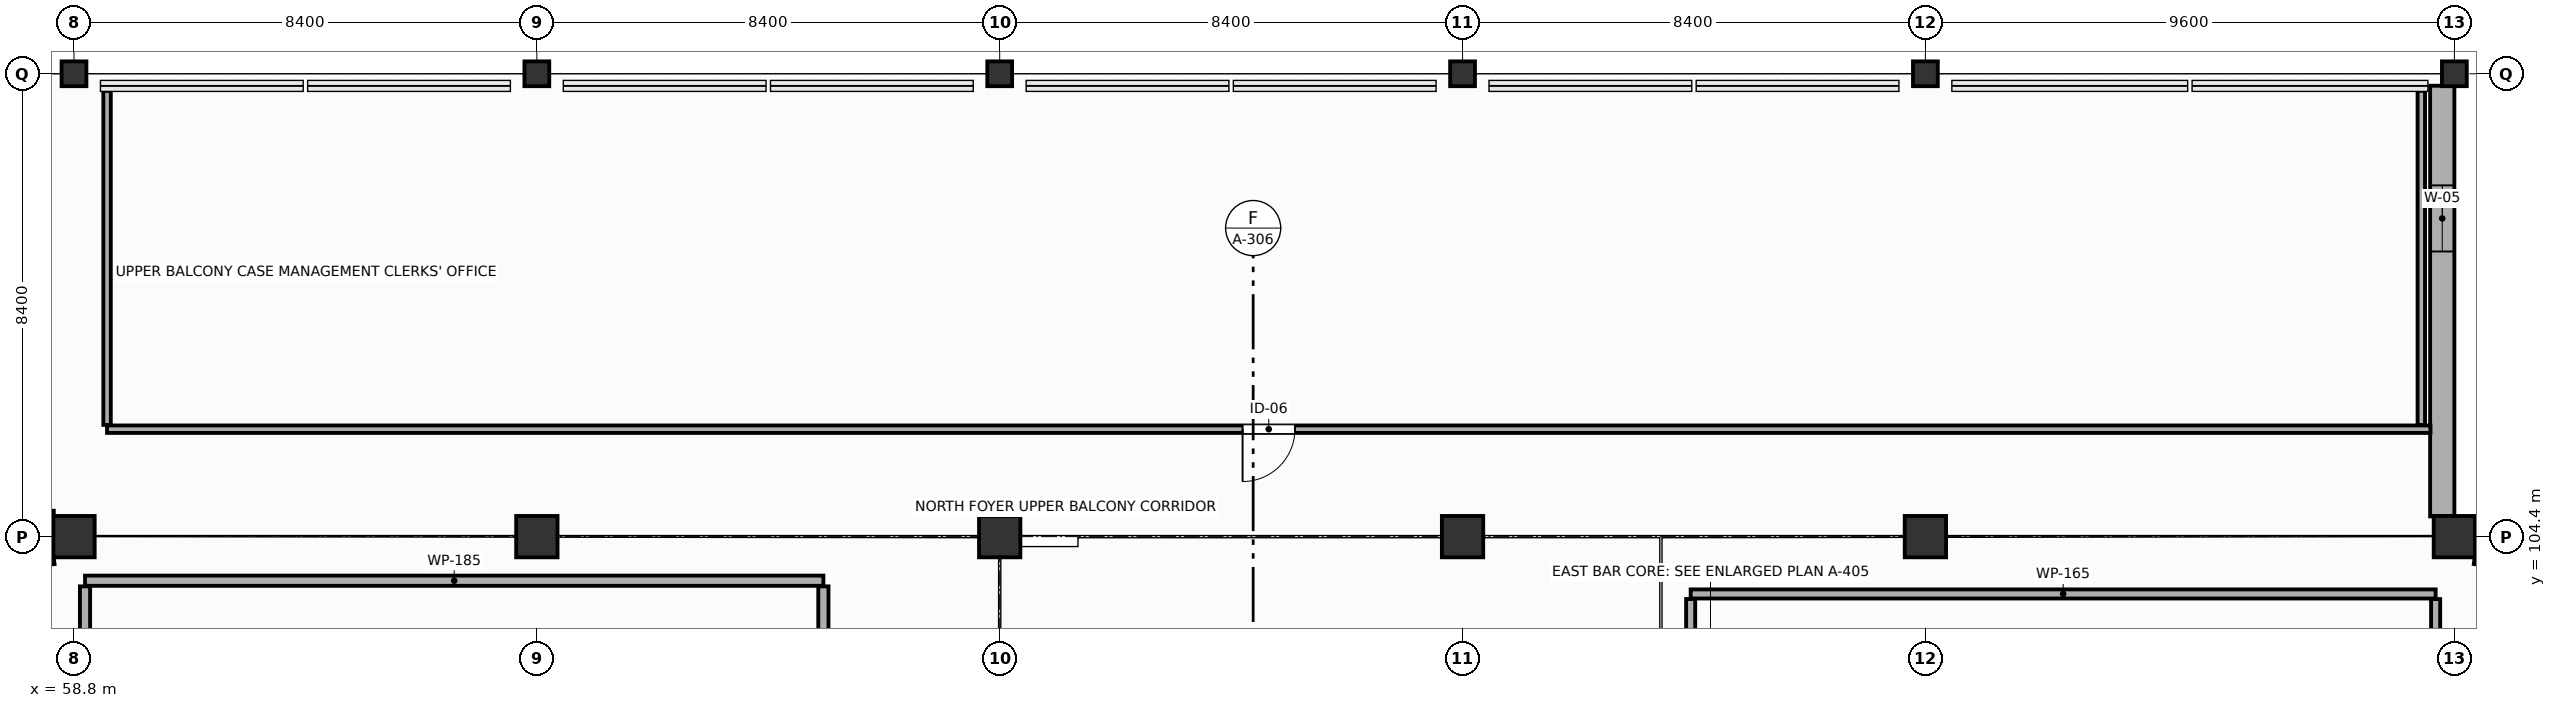
"""IFC4 building model, lengths in metres.
Left out: names, types, materials, properties, quantities, classifications, styles, units other than length and angle.
Written with IfcOpenShell. Run it as: python <this file> out.ifc"""

import sys

from ifc_helpers import new_model, si_unit, direction, frame, frame_2d, origin, origin_2d, place, context, subcontext, project, spatial, rectangle, extrude, element, fill, save


model = new_model("IFC4")
c1 = context("Model", 3, precision=1e-05, world=origin(), true_north=direction((0.0, 1.0)))
c2 = subcontext(c1, "Body", "Model", "MODEL_VIEW")
j1 = project(units=[si_unit("LENGTHUNIT", "METRE"), si_unit("PLANEANGLEUNIT", "RADIAN")], contexts=[c1])
p1 = place(None, origin())
s1 = spatial("IfcSite", under=j1, at=p1, CompositionType="ELEMENT")
p2 = place(p1, origin())
s2 = spatial("IfcBuilding", under=s1, at=p2, CompositionType="ELEMENT")
p3 = place(p2, frame((0.0, 0.0, 9.9)))
s3 = spatial("IfcBuildingStorey", under=s2, at=p3, CompositionType="ELEMENT", Elevation=9.9)
p4 = place(p3, frame((58.8, 104.4, 0.0), z_axis=(0.0, 0.0, 1.0), x_axis=(1.0, 0.0, 0.0)))
e1 = element("IfcColumn", 1, at=p4, inside=s3, PredefinedType="COLUMN", context=c2, shape_type="SweptSolid", body=[
    extrude(rectangle(XDim=0.75, YDim=0.75, at=origin_2d()), origin(), (0.0, 0.0, 1.0), 4.5),
])
p5 = place(p3, frame((58.8, 112.8, 0.0), z_axis=(0.0, 0.0, 1.0), x_axis=(1.0, 0.0, 0.0)))
e2 = element("IfcColumn", 2, at=p5, inside=s3, PredefinedType="COLUMN", context=c2, shape_type="SweptSolid", body=[
    extrude(rectangle(XDim=0.45, YDim=0.45, at=origin_2d()), origin(), (0.0, 0.0, 1.0), 4.5),
])
p6 = place(p3, frame((67.2, 104.4, 0.0), z_axis=(0.0, 0.0, 1.0), x_axis=(1.0, 0.0, 0.0)))
e3 = element("IfcColumn", 3, at=p6, inside=s3, PredefinedType="COLUMN", context=c2, shape_type="SweptSolid", body=[
    extrude(rectangle(XDim=0.75, YDim=0.75, at=origin_2d()), origin(), (0.0, 0.0, 1.0), 4.5),
])
p7 = place(p3, frame((67.2, 112.8, 0.0), z_axis=(0.0, 0.0, 1.0), x_axis=(1.0, 0.0, 0.0)))
e4 = element("IfcColumn", 4, at=p7, inside=s3, PredefinedType="COLUMN", context=c2, shape_type="SweptSolid", body=[
    extrude(rectangle(XDim=0.45, YDim=0.45, at=origin_2d()), origin(), (0.0, 0.0, 1.0), 4.5),
])
p8 = place(p3, frame((75.6, 104.4, 0.0), z_axis=(0.0, 0.0, 1.0), x_axis=(1.0, 0.0, 0.0)))
e5 = element("IfcColumn", 5, at=p8, inside=s3, PredefinedType="COLUMN", context=c2, shape_type="SweptSolid", body=[
    extrude(rectangle(XDim=0.75, YDim=0.75, at=origin_2d()), origin(), (0.0, 0.0, 1.0), 4.5),
])
p9 = place(p3, frame((75.6, 112.8, 0.0), z_axis=(0.0, 0.0, 1.0), x_axis=(1.0, 0.0, 0.0)))
e6 = element("IfcColumn", 6, at=p9, inside=s3, PredefinedType="COLUMN", context=c2, shape_type="SweptSolid", body=[
    extrude(rectangle(XDim=0.45, YDim=0.45, at=origin_2d()), origin(), (0.0, 0.0, 1.0), 4.5),
])
p10 = place(p3, frame((84.0, 104.4, 0.0), z_axis=(0.0, 0.0, 1.0), x_axis=(1.0, 0.0, 0.0)))
e7 = element("IfcColumn", 7, at=p10, inside=s3, PredefinedType="COLUMN", context=c2, shape_type="SweptSolid", body=[
    extrude(rectangle(XDim=0.75, YDim=0.75, at=origin_2d()), origin(), (0.0, 0.0, 1.0), 4.5),
])
p11 = place(p3, frame((84.0, 112.8, 0.0), z_axis=(0.0, 0.0, 1.0), x_axis=(1.0, 0.0, 0.0)))
e8 = element("IfcColumn", 8, at=p11, inside=s3, PredefinedType="COLUMN", context=c2, shape_type="SweptSolid", body=[
    extrude(rectangle(XDim=0.45, YDim=0.45, at=origin_2d()), origin(), (0.0, 0.0, 1.0), 4.5),
])
p12 = place(p3, frame((92.4, 104.4, 0.0), z_axis=(0.0, 0.0, 1.0), x_axis=(1.0, 0.0, 0.0)))
e9 = element("IfcColumn", 9, at=p12, inside=s3, PredefinedType="COLUMN", context=c2, shape_type="SweptSolid", body=[
    extrude(rectangle(XDim=0.75, YDim=0.75, at=origin_2d()), origin(), (0.0, 0.0, 1.0), 4.5),
])
p13 = place(p3, frame((92.4, 112.8, 0.0), z_axis=(0.0, 0.0, 1.0), x_axis=(1.0, 0.0, 0.0)))
e10 = element("IfcColumn", 10, at=p13, inside=s3, PredefinedType="COLUMN", context=c2, shape_type="SweptSolid", body=[
    extrude(rectangle(XDim=0.45, YDim=0.45, at=origin_2d()), origin(), (0.0, 0.0, 1.0), 4.5),
])
p14 = place(p3, frame((102.0, 104.4, 0.0), z_axis=(0.0, 0.0, 1.0), x_axis=(1.0, 0.0, 0.0)))
e11 = element("IfcColumn", 11, at=p14, inside=s3, PredefinedType="COLUMN", context=c2, shape_type="SweptSolid", body=[
    extrude(rectangle(XDim=0.75, YDim=0.75, at=origin_2d()), origin(), (0.0, 0.0, 1.0), 4.5),
])
p15 = place(p3, frame((102.0, 112.8, 0.0), z_axis=(0.0, 0.0, 1.0), x_axis=(1.0, 0.0, 0.0)))
e12 = element("IfcColumn", 12, at=p15, inside=s3, PredefinedType="COLUMN", context=c2, shape_type="SweptSolid", body=[
    extrude(rectangle(XDim=0.45, YDim=0.45, at=origin_2d()), origin(), (0.0, 0.0, 1.0), 4.5),
])
p16 = place(p3, frame((58.433, 104.65, 0.0), z_axis=(0.0, 0.0, 1.0), x_axis=(-1.0, 0.0, 0.0)))
e13 = element("IfcWall", 13, at=p16, inside=s3, PredefinedType="STANDARD", context=c2, shape_type="SweptSolid", body=[
    extrude(rectangle(XDim=11.733, YDim=0.44, at=frame_2d((5.867, 0.0))), origin(), (0.0, 0.0, 1.0), 3.33),
])
p17 = place(p16, frame((2.708, 0.0, 0.9)))
e14 = element("IfcOpeningElement", 14, at=p17, cuts=e13, PredefinedType="OPENING", context=c2, shape_type="SweptSolid", body=[
    extrude(rectangle(XDim=1.2, YDim=1.85, at=frame_2d((0.6, 0.925))), frame((0.0, 0.23, 0.0), z_axis=(0.0, -1.0, 0.0), x_axis=(1.0, 0.0, 0.0)), (0.0, 0.0, 1.0), 0.46),
])
p18 = place(p16, frame((7.958, 0.0, 0.9)))
e15 = element("IfcOpeningElement", 15, at=p18, cuts=e13, PredefinedType="OPENING", context=c2, shape_type="SweptSolid", body=[
    extrude(rectangle(XDim=1.2, YDim=1.85, at=frame_2d((0.6, 0.925))), frame((0.0, 0.23, 0.0), z_axis=(0.0, -1.0, 0.0), x_axis=(1.0, 0.0, 0.0)), (0.0, 0.0, 1.0), 0.46),
])
p19 = place(p3, frame((101.78, 112.583, 0.0), z_axis=(0.0, 0.0, 1.0), x_axis=(0.0, -1.0, 0.0)))
e16 = element("IfcWall", 16, at=p19, inside=s3, PredefinedType="STANDARD", context=c2, shape_type="SweptSolid", body=[
    extrude(rectangle(XDim=7.816, YDim=0.44, at=frame_2d((3.908, 0.0))), origin(), (0.0, 0.0, 1.0), 3.38),
])
p20 = place(p19, frame((1.808, 0.0, 0.9)))
e17 = element("IfcOpeningElement", 17, at=p20, cuts=e16, PredefinedType="OPENING", context=c2, shape_type="SweptSolid", body=[
    extrude(rectangle(XDim=1.2, YDim=1.85, at=frame_2d((0.6, 0.925))), frame((0.0, 0.23, 0.0), z_axis=(0.0, -1.0, 0.0), x_axis=(1.0, 0.0, 0.0)), (0.0, 0.0, 1.0), 0.46),
])
p21 = place(p3, frame((58.421, 104.098, 0.0), z_axis=(0.0, 0.0, 1.0), x_axis=(-0.991451982445, -0.130472090904, 0.0)))
e18 = element("IfcWall", 18, at=p21, inside=s3, PredefinedType="ELEMENTEDWALL", context=c2, shape_type="SweptSolid", body=[
    extrude(rectangle(XDim=2.874, YDim=0.395, at=frame_2d((1.437, 0.0))), origin(), (0.0, 0.0, 1.0), 3.38),
])
p22 = place(p21, frame((0.987, 0.0, 0.85)))
e19 = element("IfcOpeningElement", 19, at=p22, cuts=e18, PredefinedType="OPENING", context=c2, shape_type="SweptSolid", body=[
    extrude(rectangle(XDim=0.9, YDim=1.85, at=frame_2d((0.45, 0.925))), frame((0.0, 0.208, 0.0), z_axis=(0.0, -1.0, 0.0), x_axis=(1.0, 0.0, 0.0)), (0.0, 0.0, 1.0), 0.415),
])
p23 = place(p3, frame((105.229, 103.723, 0.0), z_axis=(0.0, 0.0, 1.0), x_axis=(-0.991451982445, 0.130472090904, 0.0)))
e20 = element("IfcWall", 20, at=p23, inside=s3, PredefinedType="ELEMENTEDWALL", context=c2, shape_type="SweptSolid", body=[
    extrude(rectangle(XDim=2.874, YDim=0.395, at=frame_2d((1.437, 0.0))), origin(), (0.0, 0.0, 1.0), 3.38),
])
p24 = place(p23, frame((0.987, 0.0, 0.85)))
e21 = element("IfcOpeningElement", 21, at=p24, cuts=e20, PredefinedType="OPENING", context=c2, shape_type="SweptSolid", body=[
    extrude(rectangle(XDim=0.9, YDim=1.85, at=frame_2d((0.45, 0.925))), frame((0.0, 0.208, 0.0), z_axis=(0.0, -1.0, 0.0), x_axis=(1.0, 0.0, 0.0)), (0.0, 0.0, 1.0), 0.415),
])
p25 = place(p3, frame((101.566, 106.35, 0.0), z_axis=(0.0, 0.0, 1.0), x_axis=(-1.0, 0.0, 0.0)))
e22 = element("IfcWall", 22, at=p25, inside=s3, PredefinedType="PARTITIONING", context=c2, shape_type="SweptSolid", body=[
    extrude(rectangle(XDim=42.166, YDim=0.135, at=frame_2d((21.083, 0.0))), origin(), (0.0, 0.0, 1.0), 3.73),
])
p26 = place(p25, frame((20.608, 0.0, 0.0)))
e23 = element("IfcOpeningElement", 23, at=p26, cuts=e22, PredefinedType="OPENING", context=c2, shape_type="SweptSolid", body=[
    extrude(rectangle(XDim=0.95, YDim=2.15, at=frame_2d((0.475, 1.075))), frame((0.0, 0.077, 0.0), z_axis=(0.0, -1.0, 0.0), x_axis=(1.0, 0.0, 0.0)), (0.0, 0.0, 1.0), 0.155),
])
p27 = place(p3, frame((59.4, 106.427, 0.0), z_axis=(0.0, 0.0, 1.0), x_axis=(0.0, 1.0, 0.0)))
e24 = element("IfcWall", 24, at=p27, inside=s3, PredefinedType="PARTITIONING", context=c2, shape_type="SweptSolid", body=[
    extrude(rectangle(XDim=6.062, YDim=0.135, at=frame_2d((3.031, 0.0))), origin(), (0.0, 0.0, 1.0), 3.78),
])
p28 = place(p3, frame((101.4, 112.49, 0.0), z_axis=(0.0, 0.0, 1.0), x_axis=(0.0, -1.0, 0.0)))
e25 = element("IfcWall", 25, at=p28, inside=s3, PredefinedType="PARTITIONING", context=c2, shape_type="SweptSolid", body=[
    extrude(rectangle(XDim=6.062, YDim=0.135, at=frame_2d((3.031, 0.0))), origin(), (0.0, 0.0, 1.0), 3.68),
])
p29 = place(p3, frame((59.0, 103.6, 0.0), z_axis=(0.0, 0.0, 1.0), x_axis=(1.0, 0.0, 0.0)))
e26 = element("IfcWall", 26, at=p29, inside=s3, PredefinedType="PARTITIONING", context=c2, shape_type="SweptSolid", body=[
    extrude(rectangle(XDim=13.4, YDim=0.185, at=frame_2d((6.7, 0.0))), origin(), (0.0, 0.0, 1.0), 3.38),
])
p30 = place(p3, frame((59.0, 95.702, 0.0), z_axis=(0.0, 0.0, 1.0), x_axis=(0.0, 1.0, 0.0)))
e27 = element("IfcWall", 27, at=p30, inside=s3, PredefinedType="PARTITIONING", context=c2, shape_type="SweptSolid", body=[
    extrude(rectangle(XDim=7.795, YDim=0.185, at=frame_2d((3.897, 0.0))), origin(), (0.0, 0.0, 1.0), 3.38),
])
p31 = place(p3, frame((72.4, 103.498, 0.0), z_axis=(0.0, 0.0, 1.0), x_axis=(0.0, -1.0, 0.0)))
e28 = element("IfcWall", 28, at=p31, inside=s3, PredefinedType="PARTITIONING", context=c2, shape_type="SweptSolid", body=[
    extrude(rectangle(XDim=7.795, YDim=0.185, at=frame_2d((3.897, 0.0))), origin(), (0.0, 0.0, 1.0), 3.63),
])
p32 = place(p31, frame((2.133, 0.0, 0.0)))
e29 = element("IfcOpeningElement", 29, at=p32, cuts=e28, PredefinedType="OPENING", context=c2, shape_type="SweptSolid", body=[
    extrude(rectangle(XDim=2.0, YDim=2.5, at=frame_2d((1.0, 1.25))), frame((0.0, 0.103, 0.0), z_axis=(0.0, -1.0, 0.0), x_axis=(1.0, 0.0, 0.0)), (0.0, 0.0, 1.0), 0.205),
])
p33 = place(p3, frame((88.14, 103.36, 0.0), z_axis=(0.0, 0.0, 1.0), x_axis=(1.0, 0.0, 0.0)))
e30 = element("IfcWall", 30, at=p33, inside=s3, PredefinedType="PARTITIONING", context=c2, shape_type="SweptSolid", body=[
    extrude(rectangle(XDim=13.52, YDim=0.165, at=frame_2d((6.76, 0.0))), origin(), (0.0, 0.0, 1.0), 3.38),
])
p34 = place(p3, frame((88.14, 92.183, 0.0), z_axis=(0.0, 0.0, 1.0), x_axis=(0.0, 1.0, 0.0)))
e31 = element("IfcWall", 31, at=p34, inside=s3, PredefinedType="PARTITIONING", context=c2, shape_type="SweptSolid", body=[
    extrude(rectangle(XDim=11.085, YDim=0.165, at=frame_2d((5.542, 0.0))), origin(), (0.0, 0.0, 1.0), 3.68),
])
p35 = place(p3, frame((101.66, 103.268, 0.0), z_axis=(0.0, 0.0, 1.0), x_axis=(0.0, -1.0, 0.0)))
e32 = element("IfcWall", 32, at=p35, inside=s3, PredefinedType="PARTITIONING", context=c2, shape_type="SweptSolid", body=[
    extrude(rectangle(XDim=11.085, YDim=0.165, at=frame_2d((5.542, 0.0))), origin(), (0.0, 0.0, 1.0), 3.38),
])
p36 = place(p20, origin())
e33 = element("IfcWindow", 33, at=p36, inside=s3, PartitioningType="SINGLE_PANEL", PredefinedType="WINDOW", context=c2, shape_type="SweptSolid", body=[
    extrude(rectangle(XDim=1.2, YDim=1.85, at=frame_2d((0.6, 0.925))), frame((0.0, 0.03, 0.0), z_axis=(0.0, -1.0, 0.0), x_axis=(1.0, 0.0, 0.0)), (0.0, 0.0, 1.0), 0.06),
])
fill(e17, e33)
p37 = place(p26, origin())
e34 = element("IfcDoor", 34, at=p37, inside=s3, OperationType="SINGLE_SWING_RIGHT", PredefinedType="DOOR", context=c2, shape_type="SweptSolid", body=[
    extrude(rectangle(XDim=0.95, YDim=2.15, at=frame_2d((0.475, 1.075))), frame((0.0, 0.025, 0.0), z_axis=(0.0, -1.0, 0.0), x_axis=(1.0, 0.0, 0.0)), (0.0, 0.0, 1.0), 0.05),
])
fill(e23, e34)
save(model, sys.argv[1])
